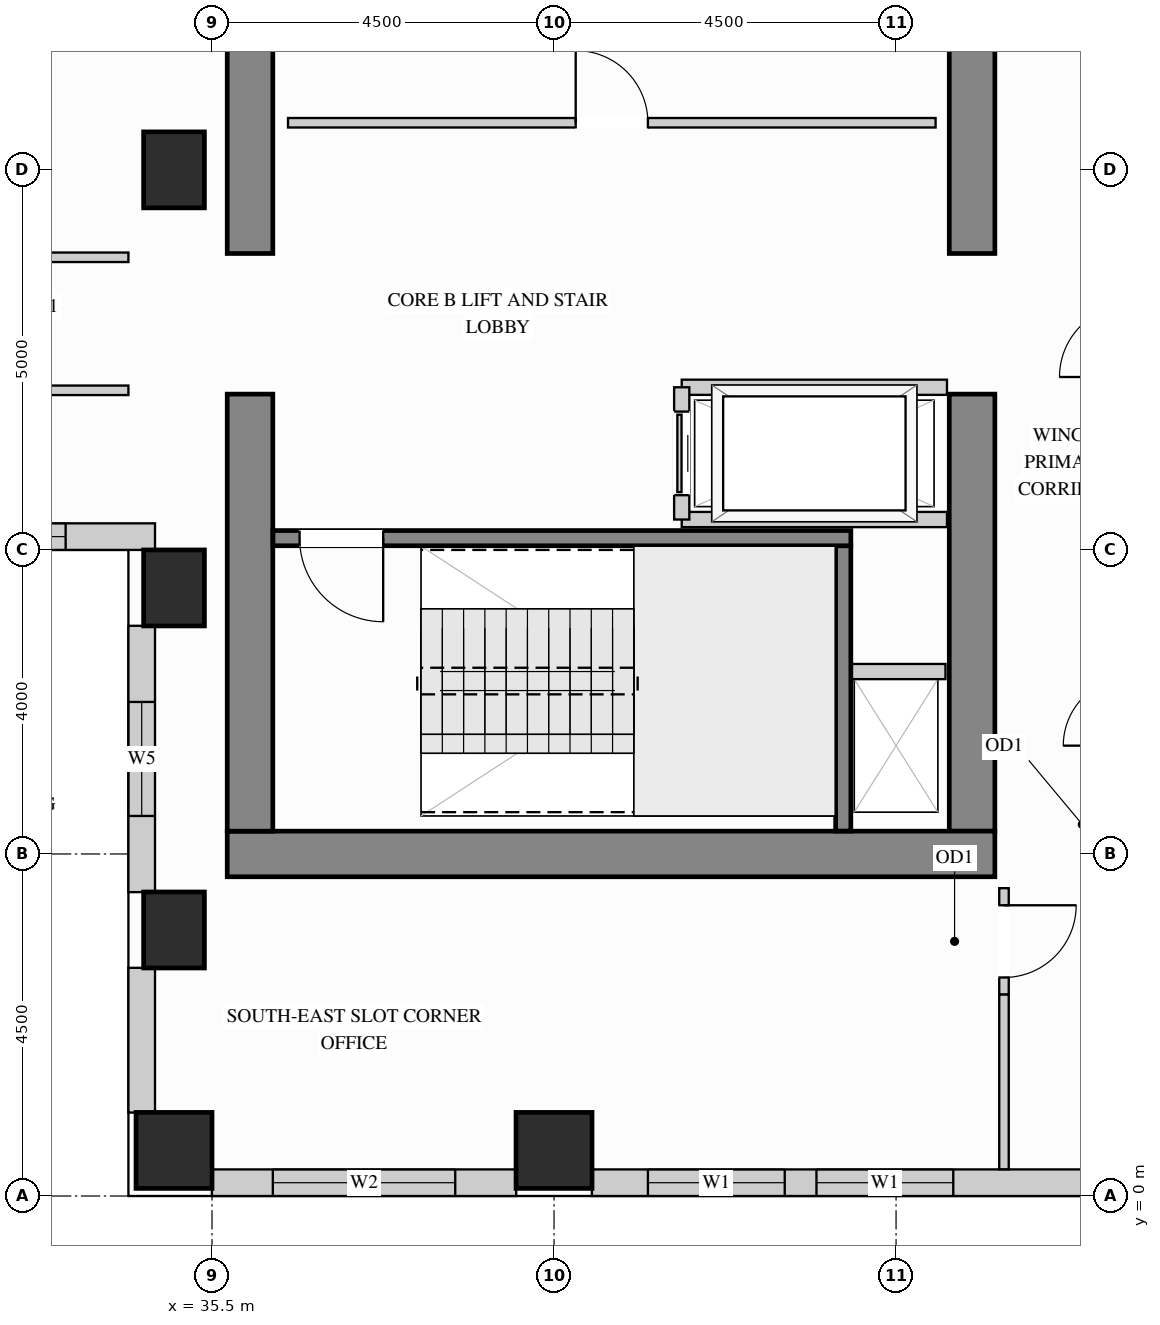
"""IFC4 building model, lengths in metres.
Left out: names, types, materials, properties, quantities, classifications, styles, units other than length and angle.
Written with IfcOpenShell. Run it as: python <this file> out.ifc"""

import sys

from ifc_helpers import new_model, si_unit, direction, frame, frame_2d, origin, origin_2d, place, context, subcontext, project, spatial, rectangle, extrude, source, transform, mapped, element, fill, save


model = new_model("IFC4")
c1 = context("Model", 3, precision=1e-05, world=origin(), true_north=direction((0.0, 1.0)))
c2 = subcontext(c1, "Body", "Model", "MODEL_VIEW")
j1 = project(units=[si_unit("LENGTHUNIT", "METRE"), si_unit("PLANEANGLEUNIT", "RADIAN")], contexts=[c1])
p1 = place(None, origin())
s1 = spatial("IfcSite", under=j1, at=p1, CompositionType="ELEMENT")
p2 = place(p1, origin())
s2 = spatial("IfcBuilding", under=s1, at=p2, CompositionType="ELEMENT")
p3 = place(p2, frame((0.0, 0.0, 200.7)))
s3 = spatial("IfcBuildingStorey", under=s2, at=p3, CompositionType="ELEMENT", Elevation=200.7)
m1 = source(origin(), c2, "Body", "SweptSolid", [
    extrude(rectangle(XDim=0.8, YDim=1.0, at=origin_2d()), origin(), (0.0, 0.0, 1.0), 3.4),
])
for number, where, z_axis, x_axis in (
    (1, (35.0, 13.5, 0.0), (0.0, 0.0, 1.0), (1.0, 0.0, 0.0)),
    (2, (35.0, 3.5, 0.0), (0.0, 0.0, 1.0), (1.0, 0.0, 0.0)),
    (3, (35.0, 8.0, 0.0), (0.0, 0.0, 1.0), (1.0, 0.0, 0.0)),
):
    element("IfcColumn", number, at=place(p3, frame(where, z_axis=z_axis, x_axis=x_axis)), inside=s3, PredefinedType="COLUMN", context=c2, shape_type="MappedRepresentation", body=[
        mapped(m1, transform((0.0, 0.0, 0.0), x_axis=(1.0, 0.0, 0.0), y_axis=(0.0, 1.0, 0.0), z_axis=(0.0, 0.0, 1.0))),
    ])
m2 = source(origin(), c2, "Body", "SweptSolid", [
    extrude(rectangle(XDim=1.0, YDim=1.0, at=origin_2d()), origin(), (0.0, 0.0, 1.0), 3.4),
])
for number, where, z_axis, x_axis in (
    (4, (35.0, 0.6, 0.0), (0.0, 0.0, 1.0), (1.0, 0.0, 0.0)),
    (5, (40.0, 0.6, 0.0), (0.0, 0.0, 1.0), (1.0, 0.0, 0.0)),
):
    element("IfcColumn", number, at=place(p3, frame(where, z_axis=z_axis, x_axis=x_axis)), inside=s3, PredefinedType="COLUMN", context=c2, shape_type="MappedRepresentation", body=[
        mapped(m2, transform((0.0, 0.0, 0.0), x_axis=(1.0, 0.0, 0.0), y_axis=(0.0, 1.0, 0.0), z_axis=(0.0, 0.0, 1.0))),
    ])
m3 = source(origin(), c2, "Body", "SweptSolid", [
    extrude(rectangle(XDim=5.75, YDim=0.6, at=frame_2d((2.875, 0.0))), origin(), (0.0, 0.0, 1.0), 3.4),
])
p4 = place(p3, frame((45.5, 4.8, 0.0), z_axis=(0.0, 0.0, 1.0), x_axis=(0.0, 1.0, 0.0)))
e6 = element("IfcWall", 6, at=p4, inside=s3, PredefinedType="SHEAR", context=c2, shape_type="MappedRepresentation", body=[
    mapped(m3, transform((0.0, 0.0, 0.0), x_axis=(1.0, 0.0, 0.0), y_axis=(0.0, 1.0, 0.0), z_axis=(0.0, 0.0, 1.0))),
])
m4 = source(origin(), c2, "Body", "SweptSolid", [
    extrude(rectangle(XDim=3.8, YDim=0.6, at=frame_2d((1.9, 0.0))), origin(), (0.0, 0.0, 1.0), 3.4),
])
p5 = place(p3, frame((45.5, 12.4, 0.0), z_axis=(0.0, 0.0, 1.0), x_axis=(0.0, 1.0, 0.0)))
e7 = element("IfcWall", 7, at=p5, inside=s3, PredefinedType="SHEAR", context=c2, shape_type="MappedRepresentation", body=[
    mapped(m4, transform((0.0, 0.0, 0.0), x_axis=(1.0, 0.0, 0.0), y_axis=(0.0, 1.0, 0.0), z_axis=(0.0, 0.0, 1.0))),
])
m5 = source(origin(), c2, "Body", "SweptSolid", [
    extrude(rectangle(XDim=10.1, YDim=0.6, at=frame_2d((5.05, 0.0))), origin(), (0.0, 0.0, 1.0), 3.4),
])
p6 = place(p3, frame((35.7, 4.5, 0.0), z_axis=(0.0, 0.0, 1.0), x_axis=(1.0, 0.0, 0.0)))
e8 = element("IfcWall", 8, at=p6, inside=s3, PredefinedType="SHEAR", context=c2, shape_type="MappedRepresentation", body=[
    mapped(m5, transform((0.0, 0.0, 0.0), x_axis=(1.0, 0.0, 0.0), y_axis=(0.0, 1.0, 0.0), z_axis=(0.0, 0.0, 1.0))),
])
p7 = place(p3, frame((36.0, 4.8, 0.0), z_axis=(0.0, 0.0, 1.0), x_axis=(0.0, 1.0, 0.0)))
e9 = element("IfcWall", 9, at=p7, inside=s3, PredefinedType="SHEAR", context=c2, shape_type="MappedRepresentation", body=[
    mapped(m3, transform((0.0, 0.0, 0.0), x_axis=(1.0, 0.0, 0.0), y_axis=(0.0, 1.0, 0.0), z_axis=(0.0, 0.0, 1.0))),
])
p8 = place(p3, frame((36.0, 12.4, 0.0), z_axis=(0.0, 0.0, 1.0), x_axis=(0.0, 1.0, 0.0)))
e10 = element("IfcWall", 10, at=p8, inside=s3, PredefinedType="SHEAR", context=c2, shape_type="MappedRepresentation", body=[
    mapped(m4, transform((0.0, 0.0, 0.0), x_axis=(1.0, 0.0, 0.0), y_axis=(0.0, 1.0, 0.0), z_axis=(0.0, 0.0, 1.0))),
])
p9 = place(p3, frame((30.898, 8.675, 0.0), z_axis=(0.0, 0.0, 1.0), x_axis=(1.0, 0.0, 0.0)))
e11 = element("IfcWall", 11, at=p9, inside=s3, PredefinedType="SOLIDWALL", context=c2, shape_type="SweptSolid", body=[
    extrude(rectangle(XDim=3.852, YDim=0.35, at=frame_2d((1.926, 0.0))), origin(), (0.0, 0.0, 1.0), 3.385),
])
p10 = place(p9, frame((1.176, 0.0, 0.78)))
e12 = element("IfcOpeningElement", 12, at=p10, cuts=e11, PredefinedType="OPENING", context=c2, shape_type="SweptSolid", body=[
    extrude(rectangle(XDim=1.5, YDim=2.0, at=frame_2d((0.75, 1.0))), frame((0.0, 0.185, 0.0), z_axis=(0.0, -1.0, 0.0), x_axis=(1.0, 0.0, 0.0)), (0.0, 0.0, 1.0), 0.37),
])
p11 = place(p3, frame((34.575, 7.502, 0.0), z_axis=(0.0, 0.0, 1.0), x_axis=(0.0, -1.0, 0.0)))
e13 = element("IfcWall", 13, at=p11, inside=s3, PredefinedType="SOLIDWALL", context=c2, shape_type="SweptSolid", body=[
    extrude(rectangle(XDim=3.504, YDim=0.35, at=frame_2d((1.752, 0.0))), origin(), (0.0, 0.0, 1.0), 2.612),
])
p12 = place(p11, frame((1.002, 0.0, 0.78)))
e14 = element("IfcOpeningElement", 14, at=p12, cuts=e13, PredefinedType="OPENING", context=c2, shape_type="SweptSolid", body=[
    extrude(rectangle(XDim=1.5, YDim=1.652, at=frame_2d((0.75, 0.826))), frame((0.0, 0.185, 0.0), z_axis=(0.0, -1.0, 0.0), x_axis=(1.0, 0.0, 0.0)), (0.0, 0.0, 1.0), 0.37),
])
m6 = source(origin(), c2, "Body", "SweptSolid", [
    extrude(rectangle(XDim=1.904, YDim=0.35, at=frame_2d((0.952, 0.0))), origin(), (0.0, 0.0, 1.0), 2.612),
])
p13 = place(p3, frame((34.575, 3.002, 0.0), z_axis=(0.0, 0.0, 1.0), x_axis=(0.0, -1.0, 0.0)))
e15 = element("IfcWall", 15, at=p13, inside=s3, PredefinedType="SOLIDWALL", context=c2, shape_type="MappedRepresentation", body=[
    mapped(m6, transform((0.0, 0.0, 0.0), x_axis=(1.0, 0.0, 0.0), y_axis=(0.0, 1.0, 0.0), z_axis=(0.0, 0.0, 1.0))),
])
p14 = place(p3, frame((35.498, 0.175, 0.0), z_axis=(0.0, 0.0, 1.0), x_axis=(1.0, 0.0, 0.0)))
e16 = element("IfcWall", 16, at=p14, inside=s3, PredefinedType="SOLIDWALL", context=c2, shape_type="SweptSolid", body=[
    extrude(rectangle(XDim=4.004, YDim=0.35, at=frame_2d((2.002, 0.0))), origin(), (0.0, 0.0, 1.0), 2.612),
])
p15 = place(p14, frame((0.802, 0.0, 0.78)))
e17 = element("IfcOpeningElement", 17, at=p15, cuts=e16, PredefinedType="OPENING", context=c2, shape_type="SweptSolid", body=[
    extrude(rectangle(XDim=2.4, YDim=1.652, at=frame_2d((1.2, 0.826))), frame((0.0, 0.185, 0.0), z_axis=(0.0, -1.0, 0.0), x_axis=(1.0, 0.0, 0.0)), (0.0, 0.0, 1.0), 0.37),
])
p16 = place(p3, frame((40.498, 0.175, 0.0), z_axis=(0.0, 0.0, 1.0), x_axis=(1.0, 0.0, 0.0)))
e18 = element("IfcWall", 18, at=p16, inside=s3, PredefinedType="SOLIDWALL", context=c2, shape_type="SweptSolid", body=[
    extrude(rectangle(XDim=6.604, YDim=0.35, at=frame_2d((3.302, 0.0))), origin(), (0.0, 0.0, 1.0), 2.612),
])
p17 = place(p16, frame((0.737, 0.0, 0.78)))
e19 = element("IfcOpeningElement", 19, at=p17, cuts=e18, PredefinedType="OPENING", context=c2, shape_type="SweptSolid", body=[
    extrude(rectangle(XDim=1.8, YDim=1.652, at=frame_2d((0.9, 0.826))), frame((0.0, 0.185, 0.0), z_axis=(0.0, -1.0, 0.0), x_axis=(1.0, 0.0, 0.0)), (0.0, 0.0, 1.0), 0.37),
])
p18 = place(p16, frame((2.955, 0.0, 0.78)))
e20 = element("IfcOpeningElement", 20, at=p18, cuts=e18, PredefinedType="OPENING", context=c2, shape_type="SweptSolid", body=[
    extrude(rectangle(XDim=1.8, YDim=1.652, at=frame_2d((0.9, 0.826))), frame((0.0, 0.185, 0.0), z_axis=(0.0, -1.0, 0.0), x_axis=(1.0, 0.0, 0.0)), (0.0, 0.0, 1.0), 0.37),
])
p19 = place(p3, frame((36.5, 14.12, 0.0), z_axis=(0.0, 0.0, 1.0), x_axis=(1.0, 0.0, 0.0)))
e21 = element("IfcWall", 21, at=p19, inside=s3, PredefinedType="PARTITIONING", context=c2, shape_type="SweptSolid", body=[
    extrude(rectangle(XDim=8.52, YDim=0.125, at=frame_2d((4.26, 0.0))), origin(), (0.0, 0.0, 1.0), 3.385),
])
p20 = place(p19, frame((3.785, 0.0, 0.0)))
e22 = element("IfcOpeningElement", 22, at=p20, cuts=e21, PredefinedType="OPENING", context=c2, shape_type="SweptSolid", body=[
    extrude(rectangle(XDim=0.95, YDim=2.15, at=frame_2d((0.475, 1.075))), frame((0.0, 0.073, 0.0), z_axis=(0.0, -1.0, 0.0), x_axis=(1.0, 0.0, 0.0)), (0.0, 0.0, 1.0), 0.145),
])
p21 = place(p3, frame((45.92, 2.65, 0.0), z_axis=(0.0, 0.0, 1.0), x_axis=(0.0, 1.0, 0.0)))
e23 = element("IfcWall", 23, at=p21, inside=s3, PredefinedType="PARTITIONING", context=c2, shape_type="SweptSolid", body=[
    extrude(rectangle(XDim=1.4, YDim=0.125, at=frame_2d((0.7, 0.0))), origin(), (0.0, 0.0, 1.0), 3.385),
])
p22 = place(p21, frame((0.225, 0.0, 0.0)))
e24 = element("IfcOpeningElement", 24, at=p22, cuts=e23, PredefinedType="OPENING", context=c2, shape_type="SweptSolid", body=[
    extrude(rectangle(XDim=0.95, YDim=2.15, at=frame_2d((0.475, 1.075))), frame((0.0, 0.073, 0.0), z_axis=(0.0, -1.0, 0.0), x_axis=(1.0, 0.0, 0.0)), (0.0, 0.0, 1.0), 0.145),
])
m7 = source(origin(), c2, "Body", "SweptSolid", [
    extrude(rectangle(XDim=2.298, YDim=0.125, at=frame_2d((1.149, 0.0))), origin(), (0.0, 0.0, 1.0), 3.385),
])
p23 = place(p3, frame((45.92, 0.352, 0.0), z_axis=(0.0, 0.0, 1.0), x_axis=(0.0, 1.0, 0.0)))
e25 = element("IfcWall", 25, at=p23, inside=s3, PredefinedType="PARTITIONING", context=c2, shape_type="MappedRepresentation", body=[
    mapped(m7, transform((0.0, 0.0, 0.0), x_axis=(1.0, 0.0, 0.0), y_axis=(0.0, 1.0, 0.0), z_axis=(0.0, 0.0, 1.0))),
])
p24 = place(p3, frame((29.85, 12.35, 0.0), z_axis=(0.0, 0.0, 1.0), x_axis=(1.0, 0.0, 0.0)))
e26 = element("IfcWall", 26, at=p24, inside=s3, PredefinedType="PARTITIONING", context=c2, shape_type="SweptSolid", body=[
    extrude(rectangle(XDim=4.55, YDim=0.125, at=frame_2d((2.275, 0.0))), origin(), (0.0, 0.0, 1.0), 3.385),
])
p25 = place(p24, frame((1.8, 0.0, 0.0)))
e27 = element("IfcOpeningElement", 27, at=p25, cuts=e26, PredefinedType="OPENING", context=c2, shape_type="SweptSolid", body=[
    extrude(rectangle(XDim=0.95, YDim=2.15, at=frame_2d((0.475, 1.075))), frame((0.0, 0.073, 0.0), z_axis=(0.0, -1.0, 0.0), x_axis=(1.0, 0.0, 0.0)), (0.0, 0.0, 1.0), 0.145),
])
p26 = place(p3, frame((29.85, 10.6, 0.0), z_axis=(0.0, 0.0, 1.0), x_axis=(1.0, 0.0, 0.0)))
e28 = element("IfcWall", 28, at=p26, inside=s3, PredefinedType="PARTITIONING", context=c2, shape_type="SweptSolid", body=[
    extrude(rectangle(XDim=4.55, YDim=0.125, at=frame_2d((2.275, 0.0))), origin(), (0.0, 0.0, 1.0), 3.385),
])
p27 = place(p26, frame((1.8, 0.0, 0.0)))
e29 = element("IfcOpeningElement", 29, at=p27, cuts=e28, PredefinedType="OPENING", context=c2, shape_type="SweptSolid", body=[
    extrude(rectangle(XDim=0.95, YDim=2.15, at=frame_2d((0.475, 1.075))), frame((0.0, 0.073, 0.0), z_axis=(0.0, -1.0, 0.0), x_axis=(1.0, 0.0, 0.0)), (0.0, 0.0, 1.0), 0.145),
])
m8 = source(origin(), c2, "Body", "SweptSolid", [
    extrude(rectangle(XDim=1.3, YDim=0.2, at=frame_2d((0.65, 0.0))), origin(), (0.0, 0.0, 1.0), 3.385),
])
p28 = place(p3, frame((43.85, 6.9, 0.0), z_axis=(0.0, 0.0, 1.0), x_axis=(1.0, 0.0, 0.0)))
e30 = element("IfcWall", 30, at=p28, inside=s3, PredefinedType="PARTITIONING", context=c2, shape_type="MappedRepresentation", body=[
    mapped(m8, transform((0.0, 0.0, 0.0), x_axis=(1.0, 0.0, 0.0), y_axis=(0.0, 1.0, 0.0), z_axis=(0.0, 0.0, 1.0))),
])
m9 = source(origin(), c2, "Body", "SweptSolid", [
    extrude(rectangle(XDim=3.49, YDim=0.2, at=frame_2d((1.745, 0.0))), origin(), (0.0, 0.0, 1.0), 3.385),
])
for number, where, z_axis, x_axis in (
    (31, (41.68, 10.64, 0.0), (0.0, 0.0, 1.0), (1.0, 0.0, 0.0)),
    (32, (41.68, 8.9, 0.0), (0.0, 0.0, 1.0), (1.0, 0.0, 0.0)),
):
    element("IfcWall", number, at=place(p3, frame(where, z_axis=z_axis, x_axis=x_axis)), inside=s3, PredefinedType="PARTITIONING", context=c2, shape_type="MappedRepresentation", body=[
        mapped(m9, transform((0.0, 0.0, 0.0), x_axis=(1.0, 0.0, 0.0), y_axis=(0.0, 1.0, 0.0), z_axis=(0.0, 0.0, 1.0))),
    ])
p29 = place(p3, frame((41.68, 8.9, 0.0), z_axis=(0.0, 0.0, 1.0), x_axis=(0.0, 1.0, 0.0)))
e33 = element("IfcWall", 33, at=p29, inside=s3, PredefinedType="PARTITIONING", context=c2, shape_type="SweptSolid", body=[
    extrude(rectangle(XDim=1.74, YDim=0.2, at=frame_2d((0.87, 0.0))), origin(), (0.0, 0.0, 1.0), 3.385),
])
p30 = place(p29, frame((0.32, 0.0, 0.0)))
e34 = element("IfcOpeningElement", 34, at=p30, cuts=e33, PredefinedType="OPENING", context=c2, shape_type="SweptSolid", body=[
    extrude(rectangle(XDim=1.1, YDim=2.2, at=frame_2d((0.55, 1.1))), frame((0.0, 0.11, 0.0), z_axis=(0.0, -1.0, 0.0), x_axis=(1.0, 0.0, 0.0)), (0.0, 0.0, 1.0), 0.22),
])
m10 = source(origin(), c2, "Body", "SweptSolid", [
    extrude(rectangle(XDim=3.753, YDim=0.2, at=frame_2d((1.876, 0.0))), origin(), (0.0, 0.0, 1.0), 3.4),
])
p31 = place(p3, frame((43.805, 4.802, 0.0), z_axis=(0.0, 0.0, 1.0), x_axis=(0.0, 1.0, 0.0)))
e35 = element("IfcWall", 35, at=p31, inside=s3, PredefinedType="SHEAR", context=c2, shape_type="MappedRepresentation", body=[
    mapped(m10, transform((0.0, 0.0, 0.0), x_axis=(1.0, 0.0, 0.0), y_axis=(0.0, 1.0, 0.0), z_axis=(0.0, 0.0, 1.0))),
])
p32 = place(p3, frame((36.302, 8.655, 0.0), z_axis=(0.0, 0.0, 1.0), x_axis=(1.0, 0.0, 0.0)))
e36 = element("IfcWall", 36, at=p32, inside=s3, PredefinedType="SHEAR", context=c2, shape_type="SweptSolid", body=[
    extrude(rectangle(XDim=7.603, YDim=0.2, at=frame_2d((3.802, 0.0))), origin(), (0.0, 0.0, 1.0), 3.4),
])
p33 = place(p32, frame((0.35, 0.0, 0.0)))
e37 = element("IfcOpeningElement", 37, at=p33, cuts=e36, PredefinedType="OPENING", context=c2, shape_type="SweptSolid", body=[
    extrude(rectangle(XDim=1.1, YDim=2.15, at=frame_2d((0.55, 1.075))), frame((0.0, 0.11, 0.0), z_axis=(0.0, -1.0, 0.0), x_axis=(1.0, 0.0, 0.0)), (0.0, 0.0, 1.0), 0.22),
])
m11 = source(origin(), c2, "Body", "SweptSolid", [
    extrude(rectangle(XDim=1.1, YDim=2.2, at=frame_2d((0.55, 1.1))), frame((0.0, 0.025, 0.0), z_axis=(0.0, -1.0, 0.0), x_axis=(1.0, 0.0, 0.0)), (0.0, 0.0, 1.0), 0.05),
])
p34 = place(p30, origin())
e38 = element("IfcDoor", 38, at=p34, inside=s3, OperationType="SLIDING_TO_LEFT", PredefinedType="DOOR", context=c2, shape_type="MappedRepresentation", body=[
    mapped(m11, transform((0.0, 0.0, 0.0), x_axis=(1.0, 0.0, 0.0), y_axis=(0.0, 1.0, 0.0), z_axis=(0.0, 0.0, 1.0))),
])
fill(e34, e38)
m12 = source(origin(), c2, "Body", "SweptSolid", [
    extrude(rectangle(XDim=0.95, YDim=2.15, at=frame_2d((0.475, 1.075))), frame((0.0, 0.025, 0.0), z_axis=(0.0, -1.0, 0.0), x_axis=(1.0, 0.0, 0.0)), (0.0, 0.0, 1.0), 0.05),
])
p35 = place(p20, origin())
e39 = element("IfcDoor", 39, at=p35, inside=s3, OperationType="SINGLE_SWING_LEFT", PredefinedType="DOOR", context=c2, shape_type="MappedRepresentation", body=[
    mapped(m12, transform((0.0, 0.0, 0.0), x_axis=(1.0, 0.0, 0.0), y_axis=(0.0, 1.0, 0.0), z_axis=(0.0, 0.0, 1.0))),
])
fill(e22, e39)
p36 = place(p22, origin())
e40 = element("IfcDoor", 40, at=p36, inside=s3, OperationType="SINGLE_SWING_RIGHT", PredefinedType="DOOR", context=c2, shape_type="MappedRepresentation", body=[
    mapped(m12, transform((0.0, 0.0, 0.0), x_axis=(1.0, 0.0, 0.0), y_axis=(0.0, 1.0, 0.0), z_axis=(0.0, 0.0, 1.0))),
])
fill(e24, e40)
m13 = source(origin(), c2, "Body", "SweptSolid", [
    extrude(rectangle(XDim=1.1, YDim=2.15, at=frame_2d((0.55, 1.075))), frame((0.0, 0.025, 0.0), z_axis=(0.0, -1.0, 0.0), x_axis=(1.0, 0.0, 0.0)), (0.0, 0.0, 1.0), 0.05),
])
p37 = place(p33, origin())
e41 = element("IfcDoor", 41, at=p37, inside=s3, OperationType="SINGLE_SWING_RIGHT", PredefinedType="DOOR", context=c2, shape_type="MappedRepresentation", body=[
    mapped(m13, transform((0.0, 0.0, 0.0), x_axis=(1.0, 0.0, 0.0), y_axis=(0.0, 1.0, 0.0), z_axis=(0.0, 0.0, 1.0))),
])
fill(e37, e41)
m14 = source(origin(), c2, "Body", "SweptSolid", [
    extrude(rectangle(XDim=1.8, YDim=1.652, at=frame_2d((0.9, 0.826))), frame((0.0, 0.03, 0.0), z_axis=(0.0, -1.0, 0.0), x_axis=(1.0, 0.0, 0.0)), (0.0, 0.0, 1.0), 0.06),
])
p38 = place(p17, origin())
e42 = element("IfcWindow", 42, at=p38, inside=s3, PartitioningType="SINGLE_PANEL", PredefinedType="WINDOW", context=c2, shape_type="MappedRepresentation", body=[
    mapped(m14, transform((0.0, 0.0, 0.0), x_axis=(1.0, 0.0, 0.0), y_axis=(0.0, 1.0, 0.0), z_axis=(0.0, 0.0, 1.0))),
])
fill(e19, e42)
p39 = place(p18, origin())
e43 = element("IfcWindow", 43, at=p39, inside=s3, PartitioningType="SINGLE_PANEL", PredefinedType="WINDOW", context=c2, shape_type="MappedRepresentation", body=[
    mapped(m14, transform((0.0, 0.0, 0.0), x_axis=(1.0, 0.0, 0.0), y_axis=(0.0, 1.0, 0.0), z_axis=(0.0, 0.0, 1.0))),
])
fill(e20, e43)
m15 = source(origin(), c2, "Body", "SweptSolid", [
    extrude(rectangle(XDim=2.4, YDim=1.652, at=frame_2d((1.2, 0.826))), frame((0.0, 0.03, 0.0), z_axis=(0.0, -1.0, 0.0), x_axis=(1.0, 0.0, 0.0)), (0.0, 0.0, 1.0), 0.06),
])
p40 = place(p15, origin())
e44 = element("IfcWindow", 44, at=p40, inside=s3, PartitioningType="SINGLE_PANEL", PredefinedType="WINDOW", context=c2, shape_type="MappedRepresentation", body=[
    mapped(m15, transform((0.0, 0.0, 0.0), x_axis=(1.0, 0.0, 0.0), y_axis=(0.0, 1.0, 0.0), z_axis=(0.0, 0.0, 1.0))),
])
fill(e17, e44)
m16 = source(origin(), c2, "Body", "SweptSolid", [
    extrude(rectangle(XDim=1.5, YDim=2.0, at=frame_2d((0.75, 1.0))), frame((0.0, 0.03, 0.0), z_axis=(0.0, -1.0, 0.0), x_axis=(1.0, 0.0, 0.0)), (0.0, 0.0, 1.0), 0.06),
])
p41 = place(p10, origin())
e45 = element("IfcWindow", 45, at=p41, inside=s3, PartitioningType="SINGLE_PANEL", PredefinedType="WINDOW", context=c2, shape_type="MappedRepresentation", body=[
    mapped(m16, transform((0.0, 0.0, 0.0), x_axis=(1.0, 0.0, 0.0), y_axis=(0.0, 1.0, 0.0), z_axis=(0.0, 0.0, 1.0))),
])
fill(e12, e45)
m17 = source(origin(), c2, "Body", "SweptSolid", [
    extrude(rectangle(XDim=1.5, YDim=1.652, at=frame_2d((0.75, 0.826))), frame((0.0, 0.03, 0.0), z_axis=(0.0, -1.0, 0.0), x_axis=(1.0, 0.0, 0.0)), (0.0, 0.0, 1.0), 0.06),
])
p42 = place(p12, origin())
e46 = element("IfcWindow", 46, at=p42, inside=s3, PartitioningType="SINGLE_PANEL", PredefinedType="WINDOW", context=c2, shape_type="MappedRepresentation", body=[
    mapped(m17, transform((0.0, 0.0, 0.0), x_axis=(1.0, 0.0, 0.0), y_axis=(0.0, 1.0, 0.0), z_axis=(0.0, 0.0, 1.0))),
])
fill(e14, e46)
save(model, sys.argv[1])
